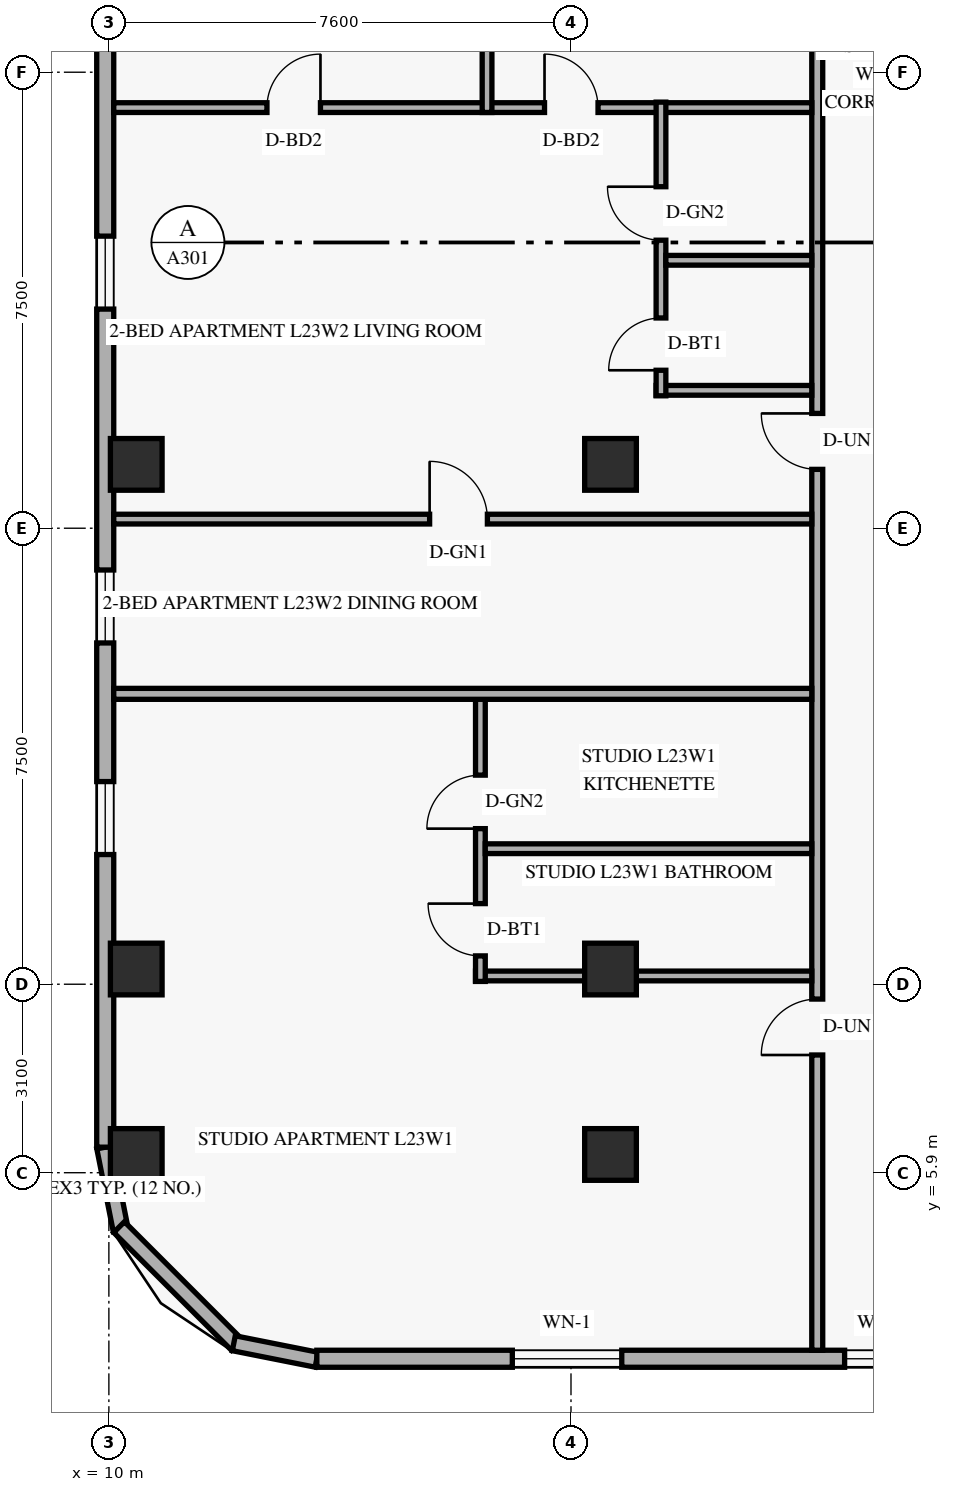
"""IFC4 building model, lengths in metres.
Left out: names, types, materials, properties, quantities, classifications, styles, units other than length and angle.
Written with IfcOpenShell. Run it as: python <this file> out.ifc"""

import sys

from ifc_helpers import new_model, si_unit, direction, frame, frame_2d, origin, origin_2d, place, context, subcontext, project, spatial, rectangle, extrude, element, fill, save


model = new_model("IFC4")
c1 = context("Model", 3, precision=1e-05, world=origin(), true_north=direction((0.0, 1.0)))
c2 = subcontext(c1, "Body", "Model", "MODEL_VIEW")
j1 = project(units=[si_unit("LENGTHUNIT", "METRE"), si_unit("PLANEANGLEUNIT", "RADIAN")], contexts=[c1])
p1 = place(None, origin())
s1 = spatial("IfcSite", under=j1, at=p1, CompositionType="ELEMENT")
p2 = place(p1, origin())
s2 = spatial("IfcBuilding", under=s1, at=p2, CompositionType="ELEMENT")
p3 = place(p2, frame((0.0, 0.0, 91.2)))
s3 = spatial("IfcBuildingStorey", under=s2, at=p3, CompositionType="ELEMENT", Elevation=91.2)
for number, where, z_axis, x_axis in (
    (1, (10.45, 6.2, 0.0), (0.0, 0.0, 1.0), (1.0, 0.0, 0.0)),
    (2, (10.45, 9.25, 0.0), (0.0, 0.0, 1.0), (1.0, 0.0, 0.0)),
    (3, (10.45, 17.55, 0.0), (0.0, 0.0, 1.0), (1.0, 0.0, 0.0)),
    (4, (18.25, 6.2, 0.0), (0.0, 0.0, 1.0), (1.0, 0.0, 0.0)),
    (5, (18.25, 9.25, 0.0), (0.0, 0.0, 1.0), (1.0, 0.0, 0.0)),
    (6, (18.25, 17.55, 0.0), (0.0, 0.0, 1.0), (1.0, 0.0, 0.0)),
):
    element("IfcColumn", number, at=place(p3, frame(where, z_axis=z_axis, x_axis=x_axis)), inside=s3, PredefinedType="COLUMN", context=c2, shape_type="SweptSolid", body=[
        extrude(rectangle(XDim=0.85, YDim=0.85, at=origin_2d()), origin(), (0.0, 0.0, 1.0), 3.6),
    ])
p4 = place(p3, frame((9.924, 6.316, 0.0), z_axis=(0.0, 0.0, 1.0), x_axis=(0.195000137217, -0.980803214965, 0.0)))
e7 = element("IfcWall", 7, at=p4, inside=s3, PredefinedType="SOLIDWALL", context=c2, shape_type="SweptSolid", body=[
    extrude(rectangle(XDim=1.388, YDim=0.25, at=frame_2d((0.694, 0.0))), origin(), (0.0, 0.0, 1.0), 3.36),
])
p5 = place(p3, frame((10.168, 5.005, 0.0), z_axis=(0.0, 0.0, 1.0), x_axis=(0.707151344399, -0.707062215165, 0.0)))
e8 = element("IfcWall", 8, at=p5, inside=s3, PredefinedType="SOLIDWALL", context=c2, shape_type="SweptSolid", body=[
    extrude(rectangle(XDim=2.739, YDim=0.25, at=frame_2d((1.37, 0.0))), origin(), (0.0, 0.0, 1.0), 3.36),
])
p6 = place(p3, frame((12.054, 3.095, 0.0), z_axis=(0.0, 0.0, 1.0), x_axis=(0.980809899341, -0.19496651342, 0.0)))
e9 = element("IfcWall", 9, at=p6, inside=s3, PredefinedType="SOLIDWALL", context=c2, shape_type="SweptSolid", body=[
    extrude(rectangle(XDim=1.389, YDim=0.25, at=frame_2d((0.694, 0.0))), origin(), (0.0, 0.0, 1.0), 3.36),
])
p7 = place(p3, frame((13.42, 2.84, 0.0), z_axis=(0.0, 0.0, 1.0), x_axis=(1.0, 0.0, 0.0)))
e10 = element("IfcWall", 10, at=p7, inside=s3, PredefinedType="SOLIDWALL", context=c2, shape_type="SweptSolid", body=[
    extrude(rectangle(XDim=36.56, YDim=0.28, at=frame_2d((18.28, 0.0))), origin(), (0.0, 0.0, 1.0), 3.36),
])
p8 = place(p7, frame((3.215, 0.0, 0.85)))
e11 = element("IfcOpeningElement", 11, at=p8, cuts=e10, PredefinedType="OPENING", context=c2, shape_type="SweptSolid", body=[
    extrude(rectangle(XDim=1.8, YDim=1.6, at=frame_2d((0.9, 0.8))), frame((0.0, 0.15, 0.0), z_axis=(0.0, -1.0, 0.0), x_axis=(1.0, 0.0, 0.0)), (0.0, 0.0, 1.0), 0.3),
])
p9 = place(p7, frame((8.68, 0.0, 0.85)))
e12 = element("IfcOpeningElement", 12, at=p9, cuts=e10, PredefinedType="OPENING", context=c2, shape_type="SweptSolid", body=[
    extrude(rectangle(XDim=1.2, YDim=1.5, at=frame_2d((0.6, 0.75))), frame((0.0, 0.15, 0.0), z_axis=(0.0, -1.0, 0.0), x_axis=(1.0, 0.0, 0.0)), (0.0, 0.0, 1.0), 0.3),
])
p10 = place(p7, frame((12.172, 0.0, 0.85)))
e13 = element("IfcOpeningElement", 13, at=p10, cuts=e10, PredefinedType="OPENING", context=c2, shape_type="SweptSolid", body=[
    extrude(rectangle(XDim=1.8, YDim=1.6, at=frame_2d((0.9, 0.8))), frame((0.0, 0.15, 0.0), z_axis=(0.0, -1.0, 0.0), x_axis=(1.0, 0.0, 0.0)), (0.0, 0.0, 1.0), 0.3),
])
p11 = place(p7, frame((18.008, 0.0, 0.85)))
e14 = element("IfcOpeningElement", 14, at=p11, cuts=e10, PredefinedType="OPENING", context=c2, shape_type="SweptSolid", body=[
    extrude(rectangle(XDim=1.8, YDim=1.6, at=frame_2d((0.9, 0.8))), frame((0.0, 0.15, 0.0), z_axis=(0.0, -1.0, 0.0), x_axis=(1.0, 0.0, 0.0)), (0.0, 0.0, 1.0), 0.3),
])
p12 = place(p7, frame((22.465, 0.0, 0.85)))
e15 = element("IfcOpeningElement", 15, at=p12, cuts=e10, PredefinedType="OPENING", context=c2, shape_type="SweptSolid", body=[
    extrude(rectangle(XDim=1.2, YDim=1.5, at=frame_2d((0.6, 0.75))), frame((0.0, 0.15, 0.0), z_axis=(0.0, -1.0, 0.0), x_axis=(1.0, 0.0, 0.0)), (0.0, 0.0, 1.0), 0.3),
])
p13 = place(p7, frame((29.445, 0.0, 0.85)))
e16 = element("IfcOpeningElement", 16, at=p13, cuts=e10, PredefinedType="OPENING", context=c2, shape_type="SweptSolid", body=[
    extrude(rectangle(XDim=1.8, YDim=1.6, at=frame_2d((0.9, 0.8))), frame((0.0, 0.15, 0.0), z_axis=(0.0, -1.0, 0.0), x_axis=(1.0, 0.0, 0.0)), (0.0, 0.0, 1.0), 0.3),
])
p14 = place(p3, frame((9.94, 41.68, 0.0), z_axis=(0.0, 0.0, 1.0), x_axis=(0.0, -1.0, 0.0)))
e17 = element("IfcWall", 17, at=p14, inside=s3, PredefinedType="SOLIDWALL", context=c2, shape_type="SweptSolid", body=[
    extrude(rectangle(XDim=35.36, YDim=0.28, at=frame_2d((17.68, 0.0))), origin(), (0.0, 0.0, 1.0), 3.36),
])
p15 = place(p14, frame((29.347, 0.0, 0.85)))
e18 = element("IfcOpeningElement", 18, at=p15, cuts=e17, PredefinedType="OPENING", context=c2, shape_type="SweptSolid", body=[
    extrude(rectangle(XDim=1.2, YDim=1.5, at=frame_2d((0.6, 0.75))), frame((0.0, 0.15, 0.0), z_axis=(0.0, -1.0, 0.0), x_axis=(1.0, 0.0, 0.0)), (0.0, 0.0, 1.0), 0.3),
])
p16 = place(p14, frame((25.867, 0.0, 0.85)))
e19 = element("IfcOpeningElement", 19, at=p16, cuts=e17, PredefinedType="OPENING", context=c2, shape_type="SweptSolid", body=[
    extrude(rectangle(XDim=1.2, YDim=1.5, at=frame_2d((0.6, 0.75))), frame((0.0, 0.15, 0.0), z_axis=(0.0, -1.0, 0.0), x_axis=(1.0, 0.0, 0.0)), (0.0, 0.0, 1.0), 0.3),
])
p17 = place(p14, frame((20.376, 0.0, 0.85)))
e20 = element("IfcOpeningElement", 20, at=p17, cuts=e17, PredefinedType="OPENING", context=c2, shape_type="SweptSolid", body=[
    extrude(rectangle(XDim=1.2, YDim=1.5, at=frame_2d((0.6, 0.75))), frame((0.0, 0.15, 0.0), z_axis=(0.0, -1.0, 0.0), x_axis=(1.0, 0.0, 0.0)), (0.0, 0.0, 1.0), 0.3),
])
p18 = place(p14, frame((15.667, 0.0, 0.85)))
e21 = element("IfcOpeningElement", 21, at=p18, cuts=e17, PredefinedType="OPENING", context=c2, shape_type="SweptSolid", body=[
    extrude(rectangle(XDim=1.2, YDim=1.5, at=frame_2d((0.6, 0.75))), frame((0.0, 0.15, 0.0), z_axis=(0.0, -1.0, 0.0), x_axis=(1.0, 0.0, 0.0)), (0.0, 0.0, 1.0), 0.3),
])
p19 = place(p14, frame((8.99, 0.0, 0.85)))
e22 = element("IfcOpeningElement", 22, at=p19, cuts=e17, PredefinedType="OPENING", context=c2, shape_type="SweptSolid", body=[
    extrude(rectangle(XDim=1.2, YDim=1.5, at=frame_2d((0.6, 0.75))), frame((0.0, 0.15, 0.0), z_axis=(0.0, -1.0, 0.0), x_axis=(1.0, 0.0, 0.0)), (0.0, 0.0, 1.0), 0.3),
])
p20 = place(p14, frame((5.156, 0.0, 0.85)))
e23 = element("IfcOpeningElement", 23, at=p20, cuts=e17, PredefinedType="OPENING", context=c2, shape_type="SweptSolid", body=[
    extrude(rectangle(XDim=1.2, YDim=1.5, at=frame_2d((0.6, 0.75))), frame((0.0, 0.15, 0.0), z_axis=(0.0, -1.0, 0.0), x_axis=(1.0, 0.0, 0.0)), (0.0, 0.0, 1.0), 0.3),
])
p21 = place(p3, frame((21.65, 2.98, 0.0), z_axis=(0.0, 0.0, 1.0), x_axis=(0.0, 1.0, 0.0)))
e24 = element("IfcWall", 24, at=p21, inside=s3, PredefinedType="STANDARD", context=c2, shape_type="SweptSolid", body=[
    extrude(rectangle(XDim=42.04, YDim=0.18, at=frame_2d((21.02, 0.0))), origin(), (0.0, 0.0, 1.0), 2.731),
])
p22 = place(p21, frame((4.856, 0.0, 0.0)))
e25 = element("IfcOpeningElement", 25, at=p22, cuts=e24, PredefinedType="OPENING", context=c2, shape_type="SweptSolid", body=[
    extrude(rectangle(XDim=0.92, YDim=2.15, at=frame_2d((0.46, 1.075))), frame((0.0, 0.1, 0.0), z_axis=(0.0, -1.0, 0.0), x_axis=(1.0, 0.0, 0.0)), (0.0, 0.0, 1.0), 0.2),
])
p23 = place(p21, frame((14.488, 0.0, 0.0)))
e26 = element("IfcOpeningElement", 26, at=p23, cuts=e24, PredefinedType="OPENING", context=c2, shape_type="SweptSolid", body=[
    extrude(rectangle(XDim=0.92, YDim=2.15, at=frame_2d((0.46, 1.075))), frame((0.0, 0.1, 0.0), z_axis=(0.0, -1.0, 0.0), x_axis=(1.0, 0.0, 0.0)), (0.0, 0.0, 1.0), 0.2),
])
p24 = place(p21, frame((32.552, 0.0, 0.0)))
e27 = element("IfcOpeningElement", 27, at=p24, cuts=e24, PredefinedType="OPENING", context=c2, shape_type="SweptSolid", body=[
    extrude(rectangle(XDim=0.92, YDim=2.15, at=frame_2d((0.46, 1.075))), frame((0.0, 0.1, 0.0), z_axis=(0.0, -1.0, 0.0), x_axis=(1.0, 0.0, 0.0)), (0.0, 0.0, 1.0), 0.2),
])
p25 = place(p3, frame((16.03, 9.136, 0.0), z_axis=(0.0, 0.0, 1.0), x_axis=(1.0, 0.0, 0.0)))
e28 = element("IfcWall", 28, at=p25, inside=s3, PredefinedType="PLUMBINGWALL", context=c2, shape_type="SweptSolid", body=[
    extrude(rectangle(XDim=5.53, YDim=0.16, at=frame_2d((2.765, 0.0))), origin(), (0.0, 0.0, 1.0), 2.731),
])
p26 = place(p3, frame((16.11, 9.046, 0.0), z_axis=(0.0, 0.0, 1.0), x_axis=(0.0, 1.0, 0.0)))
e29 = element("IfcWall", 29, at=p26, inside=s3, PredefinedType="PLUMBINGWALL", context=c2, shape_type="SweptSolid", body=[
    extrude(rectangle(XDim=4.73, YDim=0.16, at=frame_2d((2.365, 0.0))), origin(), (0.0, 0.0, 1.0), 2.731),
])
p27 = place(p26, frame((0.42, 0.0, 0.0)))
e30 = element("IfcOpeningElement", 30, at=p27, cuts=e29, PredefinedType="OPENING", context=c2, shape_type="SweptSolid", body=[
    extrude(rectangle(XDim=0.86, YDim=2.12, at=frame_2d((0.43, 1.06))), frame((0.0, 0.09, 0.0), z_axis=(0.0, -1.0, 0.0), x_axis=(1.0, 0.0, 0.0)), (0.0, 0.0, 1.0), 0.18),
])
p28 = place(p26, frame((2.513, 0.0, 0.0)))
e31 = element("IfcOpeningElement", 31, at=p28, cuts=e29, PredefinedType="OPENING", context=c2, shape_type="SweptSolid", body=[
    extrude(rectangle(XDim=0.88, YDim=2.12, at=frame_2d((0.44, 1.06))), frame((0.0, 0.09, 0.0), z_axis=(0.0, -1.0, 0.0), x_axis=(1.0, 0.0, 0.0)), (0.0, 0.0, 1.0), 0.18),
])
p29 = place(p3, frame((16.19, 11.229, 0.0), z_axis=(0.0, 0.0, 1.0), x_axis=(1.0, 0.0, 0.0)))
e32 = element("IfcWall", 32, at=p29, inside=s3, PredefinedType="PLUMBINGWALL", context=c2, shape_type="SweptSolid", body=[
    extrude(rectangle(XDim=5.37, YDim=0.16, at=frame_2d((2.685, 0.0))), origin(), (0.0, 0.0, 1.0), 2.731),
])
p30 = place(p3, frame((10.08, 13.776, 0.0), z_axis=(0.0, 0.0, 1.0), x_axis=(1.0, 0.0, 0.0)))
e33 = element("IfcWall", 33, at=p30, inside=s3, PredefinedType="PARTITIONING", context=c2, shape_type="SweptSolid", body=[
    extrude(rectangle(XDim=11.48, YDim=0.18, at=frame_2d((5.74, 0.0))), origin(), (0.0, 0.0, 1.0), 2.731),
])
p31 = place(p3, frame((10.08, 23.418, 0.0), z_axis=(0.0, 0.0, 1.0), x_axis=(1.0, 0.0, 0.0)))
e34 = element("IfcWall", 34, at=p31, inside=s3, PredefinedType="PARTITIONING", context=c2, shape_type="SweptSolid", body=[
    extrude(rectangle(XDim=11.48, YDim=0.16, at=frame_2d((5.74, 0.0))), origin(), (0.0, 0.0, 1.0), 2.731),
])
p32 = place(p31, frame((2.52, 0.0, 0.0)))
e35 = element("IfcOpeningElement", 35, at=p32, cuts=e34, PredefinedType="OPENING", context=c2, shape_type="SweptSolid", body=[
    extrude(rectangle(XDim=0.88, YDim=2.14, at=frame_2d((0.44, 1.07))), frame((0.0, 0.09, 0.0), z_axis=(0.0, -1.0, 0.0), x_axis=(1.0, 0.0, 0.0)), (0.0, 0.0, 1.0), 0.18),
])
p33 = place(p31, frame((7.085, 0.0, 0.0)))
e36 = element("IfcOpeningElement", 36, at=p33, cuts=e34, PredefinedType="OPENING", context=c2, shape_type="SweptSolid", body=[
    extrude(rectangle(XDim=0.88, YDim=2.14, at=frame_2d((0.44, 1.07))), frame((0.0, 0.09, 0.0), z_axis=(0.0, -1.0, 0.0), x_axis=(1.0, 0.0, 0.0)), (0.0, 0.0, 1.0), 0.18),
])
p34 = place(p3, frame((19.0, 18.768, 0.0), z_axis=(0.0, 0.0, 1.0), x_axis=(1.0, 0.0, 0.0)))
e37 = element("IfcWall", 37, at=p34, inside=s3, PredefinedType="PLUMBINGWALL", context=c2, shape_type="SweptSolid", body=[
    extrude(rectangle(XDim=2.56, YDim=0.16, at=frame_2d((1.28, 0.0))), origin(), (0.0, 0.0, 1.0), 3.36),
])
p35 = place(p3, frame((19.08, 18.678, 0.0), z_axis=(0.0, 0.0, 1.0), x_axis=(0.0, 1.0, 0.0)))
e38 = element("IfcWall", 38, at=p35, inside=s3, PredefinedType="PLUMBINGWALL", context=c2, shape_type="SweptSolid", body=[
    extrude(rectangle(XDim=4.83, YDim=0.16, at=frame_2d((2.415, 0.0))), origin(), (0.0, 0.0, 1.0), 3.36),
])
p36 = place(p35, frame((0.42, 0.0, 0.0)))
e39 = element("IfcOpeningElement", 39, at=p36, cuts=e38, PredefinedType="OPENING", context=c2, shape_type="SweptSolid", body=[
    extrude(rectangle(XDim=0.86, YDim=2.12, at=frame_2d((0.43, 1.06))), frame((0.0, 0.09, 0.0), z_axis=(0.0, -1.0, 0.0), x_axis=(1.0, 0.0, 0.0)), (0.0, 0.0, 1.0), 0.18),
])
p37 = place(p35, frame((2.559, 0.0, 0.0)))
e40 = element("IfcOpeningElement", 40, at=p37, cuts=e38, PredefinedType="OPENING", context=c2, shape_type="SweptSolid", body=[
    extrude(rectangle(XDim=0.88, YDim=2.12, at=frame_2d((0.44, 1.06))), frame((0.0, 0.09, 0.0), z_axis=(0.0, -1.0, 0.0), x_axis=(1.0, 0.0, 0.0)), (0.0, 0.0, 1.0), 0.18),
])
p38 = place(p3, frame((19.16, 20.907, 0.0), z_axis=(0.0, 0.0, 1.0), x_axis=(1.0, 0.0, 0.0)))
e41 = element("IfcWall", 41, at=p38, inside=s3, PredefinedType="PLUMBINGWALL", context=c2, shape_type="SweptSolid", body=[
    extrude(rectangle(XDim=2.4, YDim=0.16, at=frame_2d((1.2, 0.0))), origin(), (0.0, 0.0, 1.0), 3.36),
])
p39 = place(p3, frame((10.08, 16.65, 0.0), z_axis=(0.0, 0.0, 1.0), x_axis=(1.0, 0.0, 0.0)))
e42 = element("IfcWall", 42, at=p39, inside=s3, PredefinedType="PARTITIONING", context=c2, shape_type="SweptSolid", body=[
    extrude(rectangle(XDim=11.48, YDim=0.16, at=frame_2d((5.74, 0.0))), origin(), (0.0, 0.0, 1.0), 2.731),
])
p40 = place(p39, frame((5.195, 0.0, 0.0)))
e43 = element("IfcOpeningElement", 43, at=p40, cuts=e42, PredefinedType="OPENING", context=c2, shape_type="SweptSolid", body=[
    extrude(rectangle(XDim=0.95, YDim=2.15, at=frame_2d((0.475, 1.075))), frame((0.0, 0.09, 0.0), z_axis=(0.0, -1.0, 0.0), x_axis=(1.0, 0.0, 0.0)), (0.0, 0.0, 1.0), 0.18),
])
p41 = place(p3, frame((16.219, 23.338, 0.0), z_axis=(0.0, 0.0, 1.0), x_axis=(0.0, 1.0, 0.0)))
e44 = element("IfcWall", 44, at=p41, inside=s3, PredefinedType="PARTITIONING", context=c2, shape_type="SweptSolid", body=[
    extrude(rectangle(XDim=4.46, YDim=0.16, at=frame_2d((2.23, 0.0))), origin(), (0.0, 0.0, 1.0), 2.731),
])
p42 = place(p8, origin())
e45 = element("IfcWindow", 45, at=p42, inside=s3, PartitioningType="SINGLE_PANEL", PredefinedType="WINDOW", context=c2, shape_type="SweptSolid", body=[
    extrude(rectangle(XDim=1.8, YDim=1.6, at=frame_2d((0.9, 0.8))), frame((0.0, 0.03, 0.0), z_axis=(0.0, -1.0, 0.0), x_axis=(1.0, 0.0, 0.0)), (0.0, 0.0, 1.0), 0.06),
])
fill(e11, e45)
p43 = place(p9, origin())
e46 = element("IfcWindow", 46, at=p43, inside=s3, PartitioningType="SINGLE_PANEL", PredefinedType="WINDOW", context=c2, shape_type="SweptSolid", body=[
    extrude(rectangle(XDim=1.2, YDim=1.5, at=frame_2d((0.6, 0.75))), frame((0.0, 0.03, 0.0), z_axis=(0.0, -1.0, 0.0), x_axis=(1.0, 0.0, 0.0)), (0.0, 0.0, 1.0), 0.06),
])
fill(e12, e46)
p44 = place(p15, origin())
e47 = element("IfcWindow", 47, at=p44, inside=s3, PartitioningType="SINGLE_PANEL", PredefinedType="WINDOW", context=c2, shape_type="SweptSolid", body=[
    extrude(rectangle(XDim=1.2, YDim=1.5, at=frame_2d((0.6, 0.75))), frame((0.0, 0.03, 0.0), z_axis=(0.0, -1.0, 0.0), x_axis=(1.0, 0.0, 0.0)), (0.0, 0.0, 1.0), 0.06),
])
fill(e18, e47)
p45 = place(p16, origin())
e48 = element("IfcWindow", 48, at=p45, inside=s3, PartitioningType="SINGLE_PANEL", PredefinedType="WINDOW", context=c2, shape_type="SweptSolid", body=[
    extrude(rectangle(XDim=1.2, YDim=1.5, at=frame_2d((0.6, 0.75))), frame((0.0, 0.03, 0.0), z_axis=(0.0, -1.0, 0.0), x_axis=(1.0, 0.0, 0.0)), (0.0, 0.0, 1.0), 0.06),
])
fill(e19, e48)
p46 = place(p17, origin())
e49 = element("IfcWindow", 49, at=p46, inside=s3, PartitioningType="SINGLE_PANEL", PredefinedType="WINDOW", context=c2, shape_type="SweptSolid", body=[
    extrude(rectangle(XDim=1.2, YDim=1.5, at=frame_2d((0.6, 0.75))), frame((0.0, 0.03, 0.0), z_axis=(0.0, -1.0, 0.0), x_axis=(1.0, 0.0, 0.0)), (0.0, 0.0, 1.0), 0.06),
])
fill(e20, e49)
p47 = place(p22, origin())
e50 = element("IfcDoor", 50, at=p47, inside=s3, OperationType="SINGLE_SWING_LEFT", PredefinedType="DOOR", context=c2, shape_type="SweptSolid", body=[
    extrude(rectangle(XDim=0.92, YDim=2.15, at=frame_2d((0.46, 1.075))), frame((0.0, 0.025, 0.0), z_axis=(0.0, -1.0, 0.0), x_axis=(1.0, 0.0, 0.0)), (0.0, 0.0, 1.0), 0.05),
])
fill(e25, e50)
p48 = place(p27, origin())
e51 = element("IfcDoor", 51, at=p48, inside=s3, OperationType="SINGLE_SWING_RIGHT", PredefinedType="DOOR", context=c2, shape_type="SweptSolid", body=[
    extrude(rectangle(XDim=0.86, YDim=2.12, at=frame_2d((0.43, 1.06))), frame((0.0, 0.025, 0.0), z_axis=(0.0, -1.0, 0.0), x_axis=(1.0, 0.0, 0.0)), (0.0, 0.0, 1.0), 0.05),
])
fill(e30, e51)
p49 = place(p28, origin())
e52 = element("IfcDoor", 52, at=p49, inside=s3, OperationType="SINGLE_SWING_LEFT", PredefinedType="DOOR", context=c2, shape_type="SweptSolid", body=[
    extrude(rectangle(XDim=0.88, YDim=2.12, at=frame_2d((0.44, 1.06))), frame((0.0, 0.025, 0.0), z_axis=(0.0, -1.0, 0.0), x_axis=(1.0, 0.0, 0.0)), (0.0, 0.0, 1.0), 0.05),
])
fill(e31, e52)
p50 = place(p40, origin())
e53 = element("IfcDoor", 53, at=p50, inside=s3, OperationType="SINGLE_SWING_LEFT", PredefinedType="DOOR", context=c2, shape_type="SweptSolid", body=[
    extrude(rectangle(XDim=0.95, YDim=2.15, at=frame_2d((0.475, 1.075))), frame((0.0, 0.025, 0.0), z_axis=(0.0, -1.0, 0.0), x_axis=(1.0, 0.0, 0.0)), (0.0, 0.0, 1.0), 0.05),
])
fill(e43, e53)
p51 = place(p23, origin())
e54 = element("IfcDoor", 54, at=p51, inside=s3, OperationType="SINGLE_SWING_RIGHT", PredefinedType="DOOR", context=c2, shape_type="SweptSolid", body=[
    extrude(rectangle(XDim=0.92, YDim=2.15, at=frame_2d((0.46, 1.075))), frame((0.0, 0.025, 0.0), z_axis=(0.0, -1.0, 0.0), x_axis=(1.0, 0.0, 0.0)), (0.0, 0.0, 1.0), 0.05),
])
fill(e26, e54)
p52 = place(p36, origin())
e55 = element("IfcDoor", 55, at=p52, inside=s3, OperationType="SINGLE_SWING_LEFT", PredefinedType="DOOR", context=c2, shape_type="SweptSolid", body=[
    extrude(rectangle(XDim=0.86, YDim=2.12, at=frame_2d((0.43, 1.06))), frame((0.0, 0.025, 0.0), z_axis=(0.0, -1.0, 0.0), x_axis=(1.0, 0.0, 0.0)), (0.0, 0.0, 1.0), 0.05),
])
fill(e39, e55)
p53 = place(p37, origin())
e56 = element("IfcDoor", 56, at=p53, inside=s3, OperationType="SINGLE_SWING_RIGHT", PredefinedType="DOOR", context=c2, shape_type="SweptSolid", body=[
    extrude(rectangle(XDim=0.88, YDim=2.12, at=frame_2d((0.44, 1.06))), frame((0.0, 0.025, 0.0), z_axis=(0.0, -1.0, 0.0), x_axis=(1.0, 0.0, 0.0)), (0.0, 0.0, 1.0), 0.05),
])
fill(e40, e56)
p54 = place(p32, origin())
e57 = element("IfcDoor", 57, at=p54, inside=s3, OperationType="SINGLE_SWING_RIGHT", PredefinedType="DOOR", context=c2, shape_type="SweptSolid", body=[
    extrude(rectangle(XDim=0.88, YDim=2.14, at=frame_2d((0.44, 1.07))), frame((0.0, 0.025, 0.0), z_axis=(0.0, -1.0, 0.0), x_axis=(1.0, 0.0, 0.0)), (0.0, 0.0, 1.0), 0.05),
])
fill(e35, e57)
p55 = place(p33, origin())
e58 = element("IfcDoor", 58, at=p55, inside=s3, OperationType="SINGLE_SWING_LEFT", PredefinedType="DOOR", context=c2, shape_type="SweptSolid", body=[
    extrude(rectangle(XDim=0.88, YDim=2.14, at=frame_2d((0.44, 1.07))), frame((0.0, 0.025, 0.0), z_axis=(0.0, -1.0, 0.0), x_axis=(1.0, 0.0, 0.0)), (0.0, 0.0, 1.0), 0.05),
])
fill(e36, e58)
save(model, sys.argv[1])
